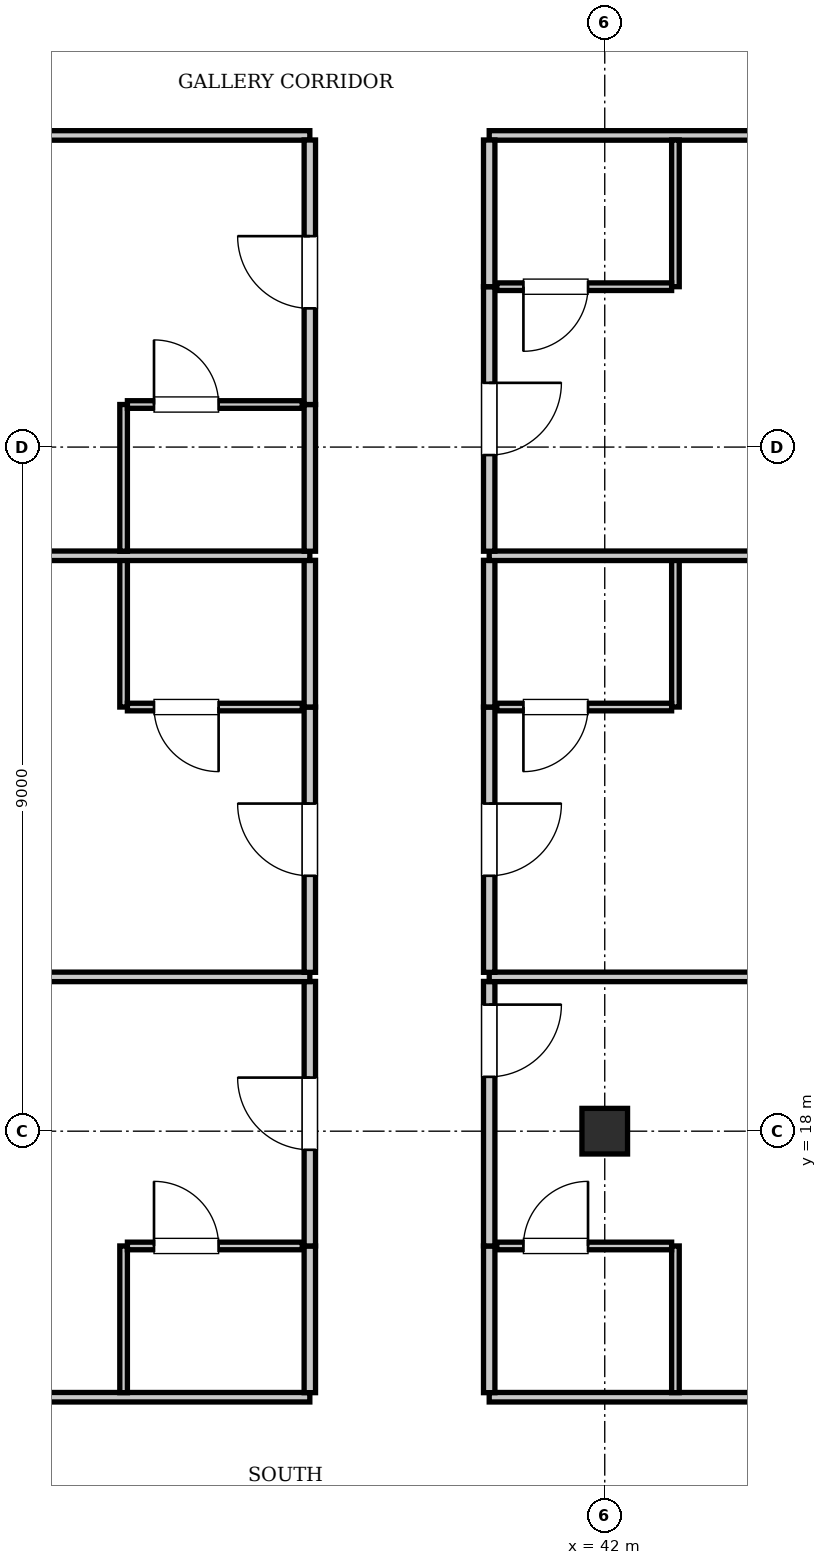
"""IFC4 building model, lengths in metres.
Left out: names, types, materials, properties, quantities, classifications, styles, units other than length and angle.
Written with IfcOpenShell. Run it as: python <this file> out.ifc"""

import sys

from ifc_helpers import new_model, si_unit, direction, frame, frame_2d, origin, origin_2d, place, context, subcontext, project, spatial, rectangle, i_section, extrude, element, fill, save


model = new_model("IFC4")
c1 = context("Model", 3, precision=1e-05, world=origin(), true_north=direction((0.0, 1.0)))
c2 = subcontext(c1, "Body", "Model", "MODEL_VIEW")
j1 = project(units=[si_unit("LENGTHUNIT", "METRE"), si_unit("PLANEANGLEUNIT", "RADIAN")], contexts=[c1])
p1 = place(None, origin())
s1 = spatial("IfcSite", under=j1, at=p1, CompositionType="ELEMENT")
p2 = place(p1, origin())
s2 = spatial("IfcBuilding", under=s1, at=p2, CompositionType="ELEMENT")
p3 = place(p2, frame((0.0, 0.0, 154.35)))
s3 = spatial("IfcBuildingStorey", under=s2, at=p3, CompositionType="ELEMENT", Elevation=154.35)
p4 = place(p3, frame((42.0, 18.0, 0.0), z_axis=(0.0, 0.0, 1.0), x_axis=(1.0, 0.0, 0.0)))
e1 = element("IfcColumn", 1, at=p4, inside=s3, PredefinedType="COLUMN", context=c2, shape_type="SweptSolid", body=[
    extrude(i_section(OverallWidth=0.6, OverallDepth=0.6, WebThickness=0.025, FlangeThickness=0.038, at=origin_2d()), origin(), (0.0, 0.0, 1.0), 3.85),
])
p5 = place(p3, frame((13.2, 14.5, 0.0), z_axis=(0.0, 0.0, 1.0), x_axis=(1.0, 0.0, 0.0)))
e2 = element("IfcWall", 2, at=p5, inside=s3, PredefinedType="PARTITIONING", context=c2, shape_type="SweptSolid", body=[
    extrude(rectangle(XDim=24.92, YDim=0.125, at=frame_2d((12.46, 0.0))), origin(), (0.0, 0.0, 1.0), 3.61),
])
p6 = place(p3, frame((40.48, 14.5, 0.0), z_axis=(0.0, 0.0, 1.0), x_axis=(1.0, 0.0, 0.0)))
e3 = element("IfcWall", 3, at=p6, inside=s3, PredefinedType="PARTITIONING", context=c2, shape_type="SweptSolid", body=[
    extrude(rectangle(XDim=21.92, YDim=0.125, at=frame_2d((10.96, 0.0))), origin(), (0.0, 0.0, 1.0), 3.61),
])
p7 = place(p3, frame((13.2, 31.1, 0.0), z_axis=(0.0, 0.0, 1.0), x_axis=(1.0, 0.0, 0.0)))
e4 = element("IfcWall", 4, at=p7, inside=s3, PredefinedType="PARTITIONING", context=c2, shape_type="SweptSolid", body=[
    extrude(rectangle(XDim=24.92, YDim=0.125, at=frame_2d((12.46, 0.0))), origin(), (0.0, 0.0, 1.0), 3.61),
])
p8 = place(p3, frame((40.48, 31.1, 0.0), z_axis=(0.0, 0.0, 1.0), x_axis=(1.0, 0.0, 0.0)))
e5 = element("IfcWall", 5, at=p8, inside=s3, PredefinedType="PARTITIONING", context=c2, shape_type="SweptSolid", body=[
    extrude(rectangle(XDim=21.92, YDim=0.125, at=frame_2d((10.96, 0.0))), origin(), (0.0, 0.0, 1.0), 3.61),
])
p9 = place(p3, frame((38.12, 14.56, 0.0), z_axis=(0.0, 0.0, 1.0), x_axis=(0.0, 1.0, 0.0)))
e6 = element("IfcWall", 6, at=p9, inside=s3, PredefinedType="PARTITIONING", context=c2, shape_type="SweptSolid", body=[
    extrude(rectangle(XDim=1.93, YDim=0.15, at=frame_2d((0.965, 0.0))), origin(), (0.0, 0.0, 1.0), 3.61),
])
p10 = place(p3, frame((38.12, 16.49, 0.0), z_axis=(0.0, 0.0, 1.0), x_axis=(0.0, 1.0, 0.0)))
e7 = element("IfcWall", 7, at=p10, inside=s3, PredefinedType="PARTITIONING", context=c2, shape_type="SweptSolid", body=[
    extrude(rectangle(XDim=3.48, YDim=0.15, at=frame_2d((1.74, 0.0))), origin(), (0.0, 0.0, 1.0), 3.61),
])
p11 = place(p10, frame((1.265, 0.0, 0.0)))
e8 = element("IfcOpeningElement", 8, at=p11, cuts=e7, PredefinedType="OPENING", context=c2, shape_type="SweptSolid", body=[
    extrude(rectangle(XDim=0.95, YDim=2.15, at=frame_2d((0.475, 1.075))), frame((0.0, 0.085, 0.0), z_axis=(0.0, -1.0, 0.0), x_axis=(1.0, 0.0, 0.0)), (0.0, 0.0, 1.0), 0.17),
])
p12 = place(p3, frame((35.67, 14.56, 0.0), z_axis=(0.0, 0.0, 1.0), x_axis=(0.0, 1.0, 0.0)))
e9 = element("IfcWall", 9, at=p12, inside=s3, PredefinedType="PARTITIONING", context=c2, shape_type="SweptSolid", body=[
    extrude(rectangle(XDim=1.93, YDim=0.1, at=frame_2d((0.965, 0.0))), origin(), (0.0, 0.0, 1.0), 3.61),
])
p13 = place(p3, frame((35.72, 16.49, 0.0), z_axis=(0.0, 0.0, 1.0), x_axis=(1.0, 0.0, 0.0)))
e10 = element("IfcWall", 10, at=p13, inside=s3, PredefinedType="PARTITIONING", context=c2, shape_type="SweptSolid", body=[
    extrude(rectangle(XDim=2.3, YDim=0.1, at=frame_2d((1.15, 0.0))), origin(), (0.0, 0.0, 1.0), 3.61),
])
p14 = place(p13, frame((0.35, 0.0, 0.0)))
e11 = element("IfcOpeningElement", 11, at=p14, cuts=e10, PredefinedType="OPENING", context=c2, shape_type="SweptSolid", body=[
    extrude(rectangle(XDim=0.85, YDim=2.1, at=frame_2d((0.425, 1.05))), frame((0.0, 0.06, 0.0), z_axis=(0.0, -1.0, 0.0), x_axis=(1.0, 0.0, 0.0)), (0.0, 0.0, 1.0), 0.12),
])
p15 = place(p3, frame((40.48, 14.56, 0.0), z_axis=(0.0, 0.0, 1.0), x_axis=(0.0, 1.0, 0.0)))
e12 = element("IfcWall", 12, at=p15, inside=s3, PredefinedType="PARTITIONING", context=c2, shape_type="SweptSolid", body=[
    extrude(rectangle(XDim=1.93, YDim=0.15, at=frame_2d((0.965, 0.0))), origin(), (0.0, 0.0, 1.0), 3.61),
])
p16 = place(p3, frame((40.48, 16.49, 0.0), z_axis=(0.0, 0.0, 1.0), x_axis=(0.0, 1.0, 0.0)))
e13 = element("IfcWall", 13, at=p16, inside=s3, PredefinedType="PARTITIONING", context=c2, shape_type="SweptSolid", body=[
    extrude(rectangle(XDim=3.48, YDim=0.15, at=frame_2d((1.74, 0.0))), origin(), (0.0, 0.0, 1.0), 3.61),
])
p17 = place(p16, frame((2.225, 0.0, 0.0)))
e14 = element("IfcOpeningElement", 14, at=p17, cuts=e13, PredefinedType="OPENING", context=c2, shape_type="SweptSolid", body=[
    extrude(rectangle(XDim=0.95, YDim=2.15, at=frame_2d((0.475, 1.075))), frame((0.0, 0.085, 0.0), z_axis=(0.0, -1.0, 0.0), x_axis=(1.0, 0.0, 0.0)), (0.0, 0.0, 1.0), 0.17),
])
p18 = place(p3, frame((42.93, 14.56, 0.0), z_axis=(0.0, 0.0, 1.0), x_axis=(0.0, 1.0, 0.0)))
e15 = element("IfcWall", 15, at=p18, inside=s3, PredefinedType="PARTITIONING", context=c2, shape_type="SweptSolid", body=[
    extrude(rectangle(XDim=1.93, YDim=0.1, at=frame_2d((0.965, 0.0))), origin(), (0.0, 0.0, 1.0), 3.61),
])
p19 = place(p3, frame((40.58, 16.49, 0.0), z_axis=(0.0, 0.0, 1.0), x_axis=(1.0, 0.0, 0.0)))
e16 = element("IfcWall", 16, at=p19, inside=s3, PredefinedType="PARTITIONING", context=c2, shape_type="SweptSolid", body=[
    extrude(rectangle(XDim=2.3, YDim=0.1, at=frame_2d((1.15, 0.0))), origin(), (0.0, 0.0, 1.0), 3.61),
])
p20 = place(p19, frame((0.35, 0.0, 0.0)))
e17 = element("IfcOpeningElement", 17, at=p20, cuts=e16, PredefinedType="OPENING", context=c2, shape_type="SweptSolid", body=[
    extrude(rectangle(XDim=0.85, YDim=2.1, at=frame_2d((0.425, 1.05))), frame((0.0, 0.06, 0.0), z_axis=(0.0, -1.0, 0.0), x_axis=(1.0, 0.0, 0.0)), (0.0, 0.0, 1.0), 0.12),
])
p21 = place(p3, frame((13.2, 20.03, 0.0), z_axis=(0.0, 0.0, 1.0), x_axis=(1.0, 0.0, 0.0)))
e18 = element("IfcWall", 18, at=p21, inside=s3, PredefinedType="PARTITIONING", context=c2, shape_type="SweptSolid", body=[
    extrude(rectangle(XDim=24.92, YDim=0.125, at=frame_2d((12.46, 0.0))), origin(), (0.0, 0.0, 1.0), 3.61),
])
p22 = place(p3, frame((40.48, 20.03, 0.0), z_axis=(0.0, 0.0, 1.0), x_axis=(1.0, 0.0, 0.0)))
e19 = element("IfcWall", 19, at=p22, inside=s3, PredefinedType="PARTITIONING", context=c2, shape_type="SweptSolid", body=[
    extrude(rectangle(XDim=21.92, YDim=0.125, at=frame_2d((10.96, 0.0))), origin(), (0.0, 0.0, 1.0), 3.61),
])
p23 = place(p3, frame((38.12, 20.09, 0.0), z_axis=(0.0, 0.0, 1.0), x_axis=(0.0, 1.0, 0.0)))
e20 = element("IfcWall", 20, at=p23, inside=s3, PredefinedType="PARTITIONING", context=c2, shape_type="SweptSolid", body=[
    extrude(rectangle(XDim=3.49, YDim=0.15, at=frame_2d((1.745, 0.0))), origin(), (0.0, 0.0, 1.0), 3.61),
])
p24 = place(p23, frame((1.27, 0.0, 0.0)))
e21 = element("IfcOpeningElement", 21, at=p24, cuts=e20, PredefinedType="OPENING", context=c2, shape_type="SweptSolid", body=[
    extrude(rectangle(XDim=0.95, YDim=2.15, at=frame_2d((0.475, 1.075))), frame((0.0, 0.085, 0.0), z_axis=(0.0, -1.0, 0.0), x_axis=(1.0, 0.0, 0.0)), (0.0, 0.0, 1.0), 0.17),
])
p25 = place(p3, frame((38.12, 23.58, 0.0), z_axis=(0.0, 0.0, 1.0), x_axis=(0.0, 1.0, 0.0)))
e22 = element("IfcWall", 22, at=p25, inside=s3, PredefinedType="PARTITIONING", context=c2, shape_type="SweptSolid", body=[
    extrude(rectangle(XDim=1.93, YDim=0.15, at=frame_2d((0.965, 0.0))), origin(), (0.0, 0.0, 1.0), 3.61),
])
p26 = place(p3, frame((35.67, 23.58, 0.0), z_axis=(0.0, 0.0, 1.0), x_axis=(0.0, 1.0, 0.0)))
e23 = element("IfcWall", 23, at=p26, inside=s3, PredefinedType="PARTITIONING", context=c2, shape_type="SweptSolid", body=[
    extrude(rectangle(XDim=1.93, YDim=0.1, at=frame_2d((0.965, 0.0))), origin(), (0.0, 0.0, 1.0), 3.61),
])
p27 = place(p3, frame((35.72, 23.58, 0.0), z_axis=(0.0, 0.0, 1.0), x_axis=(1.0, 0.0, 0.0)))
e24 = element("IfcWall", 24, at=p27, inside=s3, PredefinedType="PARTITIONING", context=c2, shape_type="SweptSolid", body=[
    extrude(rectangle(XDim=2.3, YDim=0.1, at=frame_2d((1.15, 0.0))), origin(), (0.0, 0.0, 1.0), 3.61),
])
p28 = place(p27, frame((0.35, 0.0, 0.0)))
e25 = element("IfcOpeningElement", 25, at=p28, cuts=e24, PredefinedType="OPENING", context=c2, shape_type="SweptSolid", body=[
    extrude(rectangle(XDim=0.85, YDim=2.1, at=frame_2d((0.425, 1.05))), frame((0.0, 0.06, 0.0), z_axis=(0.0, -1.0, 0.0), x_axis=(1.0, 0.0, 0.0)), (0.0, 0.0, 1.0), 0.12),
])
p29 = place(p3, frame((40.48, 20.09, 0.0), z_axis=(0.0, 0.0, 1.0), x_axis=(0.0, 1.0, 0.0)))
e26 = element("IfcWall", 26, at=p29, inside=s3, PredefinedType="PARTITIONING", context=c2, shape_type="SweptSolid", body=[
    extrude(rectangle(XDim=3.49, YDim=0.15, at=frame_2d((1.745, 0.0))), origin(), (0.0, 0.0, 1.0), 3.61),
])
p30 = place(p29, frame((1.27, 0.0, 0.0)))
e27 = element("IfcOpeningElement", 27, at=p30, cuts=e26, PredefinedType="OPENING", context=c2, shape_type="SweptSolid", body=[
    extrude(rectangle(XDim=0.95, YDim=2.15, at=frame_2d((0.475, 1.075))), frame((0.0, 0.085, 0.0), z_axis=(0.0, -1.0, 0.0), x_axis=(1.0, 0.0, 0.0)), (0.0, 0.0, 1.0), 0.17),
])
p31 = place(p3, frame((40.48, 23.58, 0.0), z_axis=(0.0, 0.0, 1.0), x_axis=(0.0, 1.0, 0.0)))
e28 = element("IfcWall", 28, at=p31, inside=s3, PredefinedType="PARTITIONING", context=c2, shape_type="SweptSolid", body=[
    extrude(rectangle(XDim=1.93, YDim=0.15, at=frame_2d((0.965, 0.0))), origin(), (0.0, 0.0, 1.0), 3.61),
])
p32 = place(p3, frame((42.93, 23.58, 0.0), z_axis=(0.0, 0.0, 1.0), x_axis=(0.0, 1.0, 0.0)))
e29 = element("IfcWall", 29, at=p32, inside=s3, PredefinedType="PARTITIONING", context=c2, shape_type="SweptSolid", body=[
    extrude(rectangle(XDim=1.93, YDim=0.1, at=frame_2d((0.965, 0.0))), origin(), (0.0, 0.0, 1.0), 3.61),
])
p33 = place(p3, frame((40.58, 23.58, 0.0), z_axis=(0.0, 0.0, 1.0), x_axis=(1.0, 0.0, 0.0)))
e30 = element("IfcWall", 30, at=p33, inside=s3, PredefinedType="PARTITIONING", context=c2, shape_type="SweptSolid", body=[
    extrude(rectangle(XDim=2.3, YDim=0.1, at=frame_2d((1.15, 0.0))), origin(), (0.0, 0.0, 1.0), 3.61),
])
p34 = place(p33, frame((0.35, 0.0, 0.0)))
e31 = element("IfcOpeningElement", 31, at=p34, cuts=e30, PredefinedType="OPENING", context=c2, shape_type="SweptSolid", body=[
    extrude(rectangle(XDim=0.85, YDim=2.1, at=frame_2d((0.425, 1.05))), frame((0.0, 0.06, 0.0), z_axis=(0.0, -1.0, 0.0), x_axis=(1.0, 0.0, 0.0)), (0.0, 0.0, 1.0), 0.12),
])
p35 = place(p3, frame((13.2, 25.57, 0.0), z_axis=(0.0, 0.0, 1.0), x_axis=(1.0, 0.0, 0.0)))
e32 = element("IfcWall", 32, at=p35, inside=s3, PredefinedType="PARTITIONING", context=c2, shape_type="SweptSolid", body=[
    extrude(rectangle(XDim=24.92, YDim=0.125, at=frame_2d((12.46, 0.0))), origin(), (0.0, 0.0, 1.0), 3.61),
])
p36 = place(p3, frame((40.48, 25.57, 0.0), z_axis=(0.0, 0.0, 1.0), x_axis=(1.0, 0.0, 0.0)))
e33 = element("IfcWall", 33, at=p36, inside=s3, PredefinedType="PARTITIONING", context=c2, shape_type="SweptSolid", body=[
    extrude(rectangle(XDim=21.92, YDim=0.125, at=frame_2d((10.96, 0.0))), origin(), (0.0, 0.0, 1.0), 3.61),
])
p37 = place(p3, frame((38.12, 25.63, 0.0), z_axis=(0.0, 0.0, 1.0), x_axis=(0.0, 1.0, 0.0)))
e34 = element("IfcWall", 34, at=p37, inside=s3, PredefinedType="PARTITIONING", context=c2, shape_type="SweptSolid", body=[
    extrude(rectangle(XDim=1.93, YDim=0.15, at=frame_2d((0.965, 0.0))), origin(), (0.0, 0.0, 1.0), 3.61),
])
p38 = place(p3, frame((38.12, 27.56, 0.0), z_axis=(0.0, 0.0, 1.0), x_axis=(0.0, 1.0, 0.0)))
e35 = element("IfcWall", 35, at=p38, inside=s3, PredefinedType="PARTITIONING", context=c2, shape_type="SweptSolid", body=[
    extrude(rectangle(XDim=3.48, YDim=0.15, at=frame_2d((1.74, 0.0))), origin(), (0.0, 0.0, 1.0), 3.61),
])
p39 = place(p38, frame((1.265, 0.0, 0.0)))
e36 = element("IfcOpeningElement", 36, at=p39, cuts=e35, PredefinedType="OPENING", context=c2, shape_type="SweptSolid", body=[
    extrude(rectangle(XDim=0.95, YDim=2.15, at=frame_2d((0.475, 1.075))), frame((0.0, 0.085, 0.0), z_axis=(0.0, -1.0, 0.0), x_axis=(1.0, 0.0, 0.0)), (0.0, 0.0, 1.0), 0.17),
])
p40 = place(p3, frame((35.67, 25.63, 0.0), z_axis=(0.0, 0.0, 1.0), x_axis=(0.0, 1.0, 0.0)))
e37 = element("IfcWall", 37, at=p40, inside=s3, PredefinedType="PARTITIONING", context=c2, shape_type="SweptSolid", body=[
    extrude(rectangle(XDim=1.93, YDim=0.1, at=frame_2d((0.965, 0.0))), origin(), (0.0, 0.0, 1.0), 3.61),
])
p41 = place(p3, frame((35.72, 27.56, 0.0), z_axis=(0.0, 0.0, 1.0), x_axis=(1.0, 0.0, 0.0)))
e38 = element("IfcWall", 38, at=p41, inside=s3, PredefinedType="PARTITIONING", context=c2, shape_type="SweptSolid", body=[
    extrude(rectangle(XDim=2.3, YDim=0.1, at=frame_2d((1.15, 0.0))), origin(), (0.0, 0.0, 1.0), 3.61),
])
p42 = place(p41, frame((0.35, 0.0, 0.0)))
e39 = element("IfcOpeningElement", 39, at=p42, cuts=e38, PredefinedType="OPENING", context=c2, shape_type="SweptSolid", body=[
    extrude(rectangle(XDim=0.85, YDim=2.1, at=frame_2d((0.425, 1.05))), frame((0.0, 0.06, 0.0), z_axis=(0.0, -1.0, 0.0), x_axis=(1.0, 0.0, 0.0)), (0.0, 0.0, 1.0), 0.12),
])
p43 = place(p3, frame((40.48, 25.63, 0.0), z_axis=(0.0, 0.0, 1.0), x_axis=(0.0, 1.0, 0.0)))
e40 = element("IfcWall", 40, at=p43, inside=s3, PredefinedType="PARTITIONING", context=c2, shape_type="SweptSolid", body=[
    extrude(rectangle(XDim=3.48, YDim=0.15, at=frame_2d((1.74, 0.0))), origin(), (0.0, 0.0, 1.0), 3.61),
])
p44 = place(p43, frame((1.265, 0.0, 0.0)))
e41 = element("IfcOpeningElement", 41, at=p44, cuts=e40, PredefinedType="OPENING", context=c2, shape_type="SweptSolid", body=[
    extrude(rectangle(XDim=0.95, YDim=2.15, at=frame_2d((0.475, 1.075))), frame((0.0, 0.085, 0.0), z_axis=(0.0, -1.0, 0.0), x_axis=(1.0, 0.0, 0.0)), (0.0, 0.0, 1.0), 0.17),
])
p45 = place(p3, frame((40.48, 29.11, 0.0), z_axis=(0.0, 0.0, 1.0), x_axis=(0.0, 1.0, 0.0)))
e42 = element("IfcWall", 42, at=p45, inside=s3, PredefinedType="PARTITIONING", context=c2, shape_type="SweptSolid", body=[
    extrude(rectangle(XDim=1.93, YDim=0.15, at=frame_2d((0.965, 0.0))), origin(), (0.0, 0.0, 1.0), 3.61),
])
p46 = place(p3, frame((42.93, 29.11, 0.0), z_axis=(0.0, 0.0, 1.0), x_axis=(0.0, 1.0, 0.0)))
e43 = element("IfcWall", 43, at=p46, inside=s3, PredefinedType="PARTITIONING", context=c2, shape_type="SweptSolid", body=[
    extrude(rectangle(XDim=1.93, YDim=0.1, at=frame_2d((0.965, 0.0))), origin(), (0.0, 0.0, 1.0), 3.61),
])
p47 = place(p3, frame((40.58, 29.11, 0.0), z_axis=(0.0, 0.0, 1.0), x_axis=(1.0, 0.0, 0.0)))
e44 = element("IfcWall", 44, at=p47, inside=s3, PredefinedType="PARTITIONING", context=c2, shape_type="SweptSolid", body=[
    extrude(rectangle(XDim=2.3, YDim=0.1, at=frame_2d((1.15, 0.0))), origin(), (0.0, 0.0, 1.0), 3.61),
])
p48 = place(p47, frame((0.35, 0.0, 0.0)))
e45 = element("IfcOpeningElement", 45, at=p48, cuts=e44, PredefinedType="OPENING", context=c2, shape_type="SweptSolid", body=[
    extrude(rectangle(XDim=0.85, YDim=2.1, at=frame_2d((0.425, 1.05))), frame((0.0, 0.06, 0.0), z_axis=(0.0, -1.0, 0.0), x_axis=(1.0, 0.0, 0.0)), (0.0, 0.0, 1.0), 0.12),
])
p49 = place(p14, origin())
e46 = element("IfcDoor", 46, at=p49, inside=s3, OperationType="SINGLE_SWING_LEFT", PredefinedType="DOOR", context=c2, shape_type="SweptSolid", body=[
    extrude(rectangle(XDim=0.85, YDim=2.1, at=frame_2d((0.425, 1.05))), frame((0.0, 0.025, 0.0), z_axis=(0.0, -1.0, 0.0), x_axis=(1.0, 0.0, 0.0)), (0.0, 0.0, 1.0), 0.05),
])
fill(e11, e46)
p50 = place(p11, origin())
e47 = element("IfcDoor", 47, at=p50, inside=s3, OperationType="SINGLE_SWING_RIGHT", PredefinedType="DOOR", context=c2, shape_type="SweptSolid", body=[
    extrude(rectangle(XDim=0.95, YDim=2.15, at=frame_2d((0.475, 1.075))), frame((0.0, 0.025, 0.0), z_axis=(0.0, -1.0, 0.0), x_axis=(1.0, 0.0, 0.0)), (0.0, 0.0, 1.0), 0.05),
])
fill(e8, e47)
p51 = place(p20, origin())
e48 = element("IfcDoor", 48, at=p51, inside=s3, OperationType="SINGLE_SWING_RIGHT", PredefinedType="DOOR", context=c2, shape_type="SweptSolid", body=[
    extrude(rectangle(XDim=0.85, YDim=2.1, at=frame_2d((0.425, 1.05))), frame((0.0, 0.025, 0.0), z_axis=(0.0, -1.0, 0.0), x_axis=(1.0, 0.0, 0.0)), (0.0, 0.0, 1.0), 0.05),
])
fill(e17, e48)
p52 = place(p17, frame((0.95, 0.0, 0.0), z_axis=(0.0, 0.0, 1.0), x_axis=(-1.0, 0.0, 0.0)))
e49 = element("IfcDoor", 49, at=p52, inside=s3, OperationType="SINGLE_SWING_LEFT", PredefinedType="DOOR", context=c2, shape_type="SweptSolid", body=[
    extrude(rectangle(XDim=0.95, YDim=2.15, at=frame_2d((0.475, 1.075))), frame((0.0, 0.025, 0.0), z_axis=(0.0, -1.0, 0.0), x_axis=(1.0, 0.0, 0.0)), (0.0, 0.0, 1.0), 0.05),
])
fill(e14, e49)
p53 = place(p28, frame((0.85, 0.0, 0.0), z_axis=(0.0, 0.0, 1.0), x_axis=(-1.0, 0.0, 0.0)))
e50 = element("IfcDoor", 50, at=p53, inside=s3, OperationType="SINGLE_SWING_LEFT", PredefinedType="DOOR", context=c2, shape_type="SweptSolid", body=[
    extrude(rectangle(XDim=0.85, YDim=2.1, at=frame_2d((0.425, 1.05))), frame((0.0, 0.025, 0.0), z_axis=(0.0, -1.0, 0.0), x_axis=(1.0, 0.0, 0.0)), (0.0, 0.0, 1.0), 0.05),
])
fill(e25, e50)
p54 = place(p24, origin())
e51 = element("IfcDoor", 51, at=p54, inside=s3, OperationType="SINGLE_SWING_RIGHT", PredefinedType="DOOR", context=c2, shape_type="SweptSolid", body=[
    extrude(rectangle(XDim=0.95, YDim=2.15, at=frame_2d((0.475, 1.075))), frame((0.0, 0.025, 0.0), z_axis=(0.0, -1.0, 0.0), x_axis=(1.0, 0.0, 0.0)), (0.0, 0.0, 1.0), 0.05),
])
fill(e21, e51)
p55 = place(p34, frame((0.85, 0.0, 0.0), z_axis=(0.0, 0.0, 1.0), x_axis=(-1.0, 0.0, 0.0)))
e52 = element("IfcDoor", 52, at=p55, inside=s3, OperationType="SINGLE_SWING_RIGHT", PredefinedType="DOOR", context=c2, shape_type="SweptSolid", body=[
    extrude(rectangle(XDim=0.85, YDim=2.1, at=frame_2d((0.425, 1.05))), frame((0.0, 0.025, 0.0), z_axis=(0.0, -1.0, 0.0), x_axis=(1.0, 0.0, 0.0)), (0.0, 0.0, 1.0), 0.05),
])
fill(e31, e52)
p56 = place(p30, frame((0.95, 0.0, 0.0), z_axis=(0.0, 0.0, 1.0), x_axis=(-1.0, 0.0, 0.0)))
e53 = element("IfcDoor", 53, at=p56, inside=s3, OperationType="SINGLE_SWING_LEFT", PredefinedType="DOOR", context=c2, shape_type="SweptSolid", body=[
    extrude(rectangle(XDim=0.95, YDim=2.15, at=frame_2d((0.475, 1.075))), frame((0.0, 0.025, 0.0), z_axis=(0.0, -1.0, 0.0), x_axis=(1.0, 0.0, 0.0)), (0.0, 0.0, 1.0), 0.05),
])
fill(e27, e53)
p57 = place(p42, origin())
e54 = element("IfcDoor", 54, at=p57, inside=s3, OperationType="SINGLE_SWING_LEFT", PredefinedType="DOOR", context=c2, shape_type="SweptSolid", body=[
    extrude(rectangle(XDim=0.85, YDim=2.1, at=frame_2d((0.425, 1.05))), frame((0.0, 0.025, 0.0), z_axis=(0.0, -1.0, 0.0), x_axis=(1.0, 0.0, 0.0)), (0.0, 0.0, 1.0), 0.05),
])
fill(e39, e54)
p58 = place(p39, origin())
e55 = element("IfcDoor", 55, at=p58, inside=s3, OperationType="SINGLE_SWING_RIGHT", PredefinedType="DOOR", context=c2, shape_type="SweptSolid", body=[
    extrude(rectangle(XDim=0.95, YDim=2.15, at=frame_2d((0.475, 1.075))), frame((0.0, 0.025, 0.0), z_axis=(0.0, -1.0, 0.0), x_axis=(1.0, 0.0, 0.0)), (0.0, 0.0, 1.0), 0.05),
])
fill(e36, e55)
p59 = place(p48, frame((0.85, 0.0, 0.0), z_axis=(0.0, 0.0, 1.0), x_axis=(-1.0, 0.0, 0.0)))
e56 = element("IfcDoor", 56, at=p59, inside=s3, OperationType="SINGLE_SWING_RIGHT", PredefinedType="DOOR", context=c2, shape_type="SweptSolid", body=[
    extrude(rectangle(XDim=0.85, YDim=2.1, at=frame_2d((0.425, 1.05))), frame((0.0, 0.025, 0.0), z_axis=(0.0, -1.0, 0.0), x_axis=(1.0, 0.0, 0.0)), (0.0, 0.0, 1.0), 0.05),
])
fill(e45, e56)
p60 = place(p44, frame((0.95, 0.0, 0.0), z_axis=(0.0, 0.0, 1.0), x_axis=(-1.0, 0.0, 0.0)))
e57 = element("IfcDoor", 57, at=p60, inside=s3, OperationType="SINGLE_SWING_LEFT", PredefinedType="DOOR", context=c2, shape_type="SweptSolid", body=[
    extrude(rectangle(XDim=0.95, YDim=2.15, at=frame_2d((0.475, 1.075))), frame((0.0, 0.025, 0.0), z_axis=(0.0, -1.0, 0.0), x_axis=(1.0, 0.0, 0.0)), (0.0, 0.0, 1.0), 0.05),
])
fill(e41, e57)
save(model, sys.argv[1])
